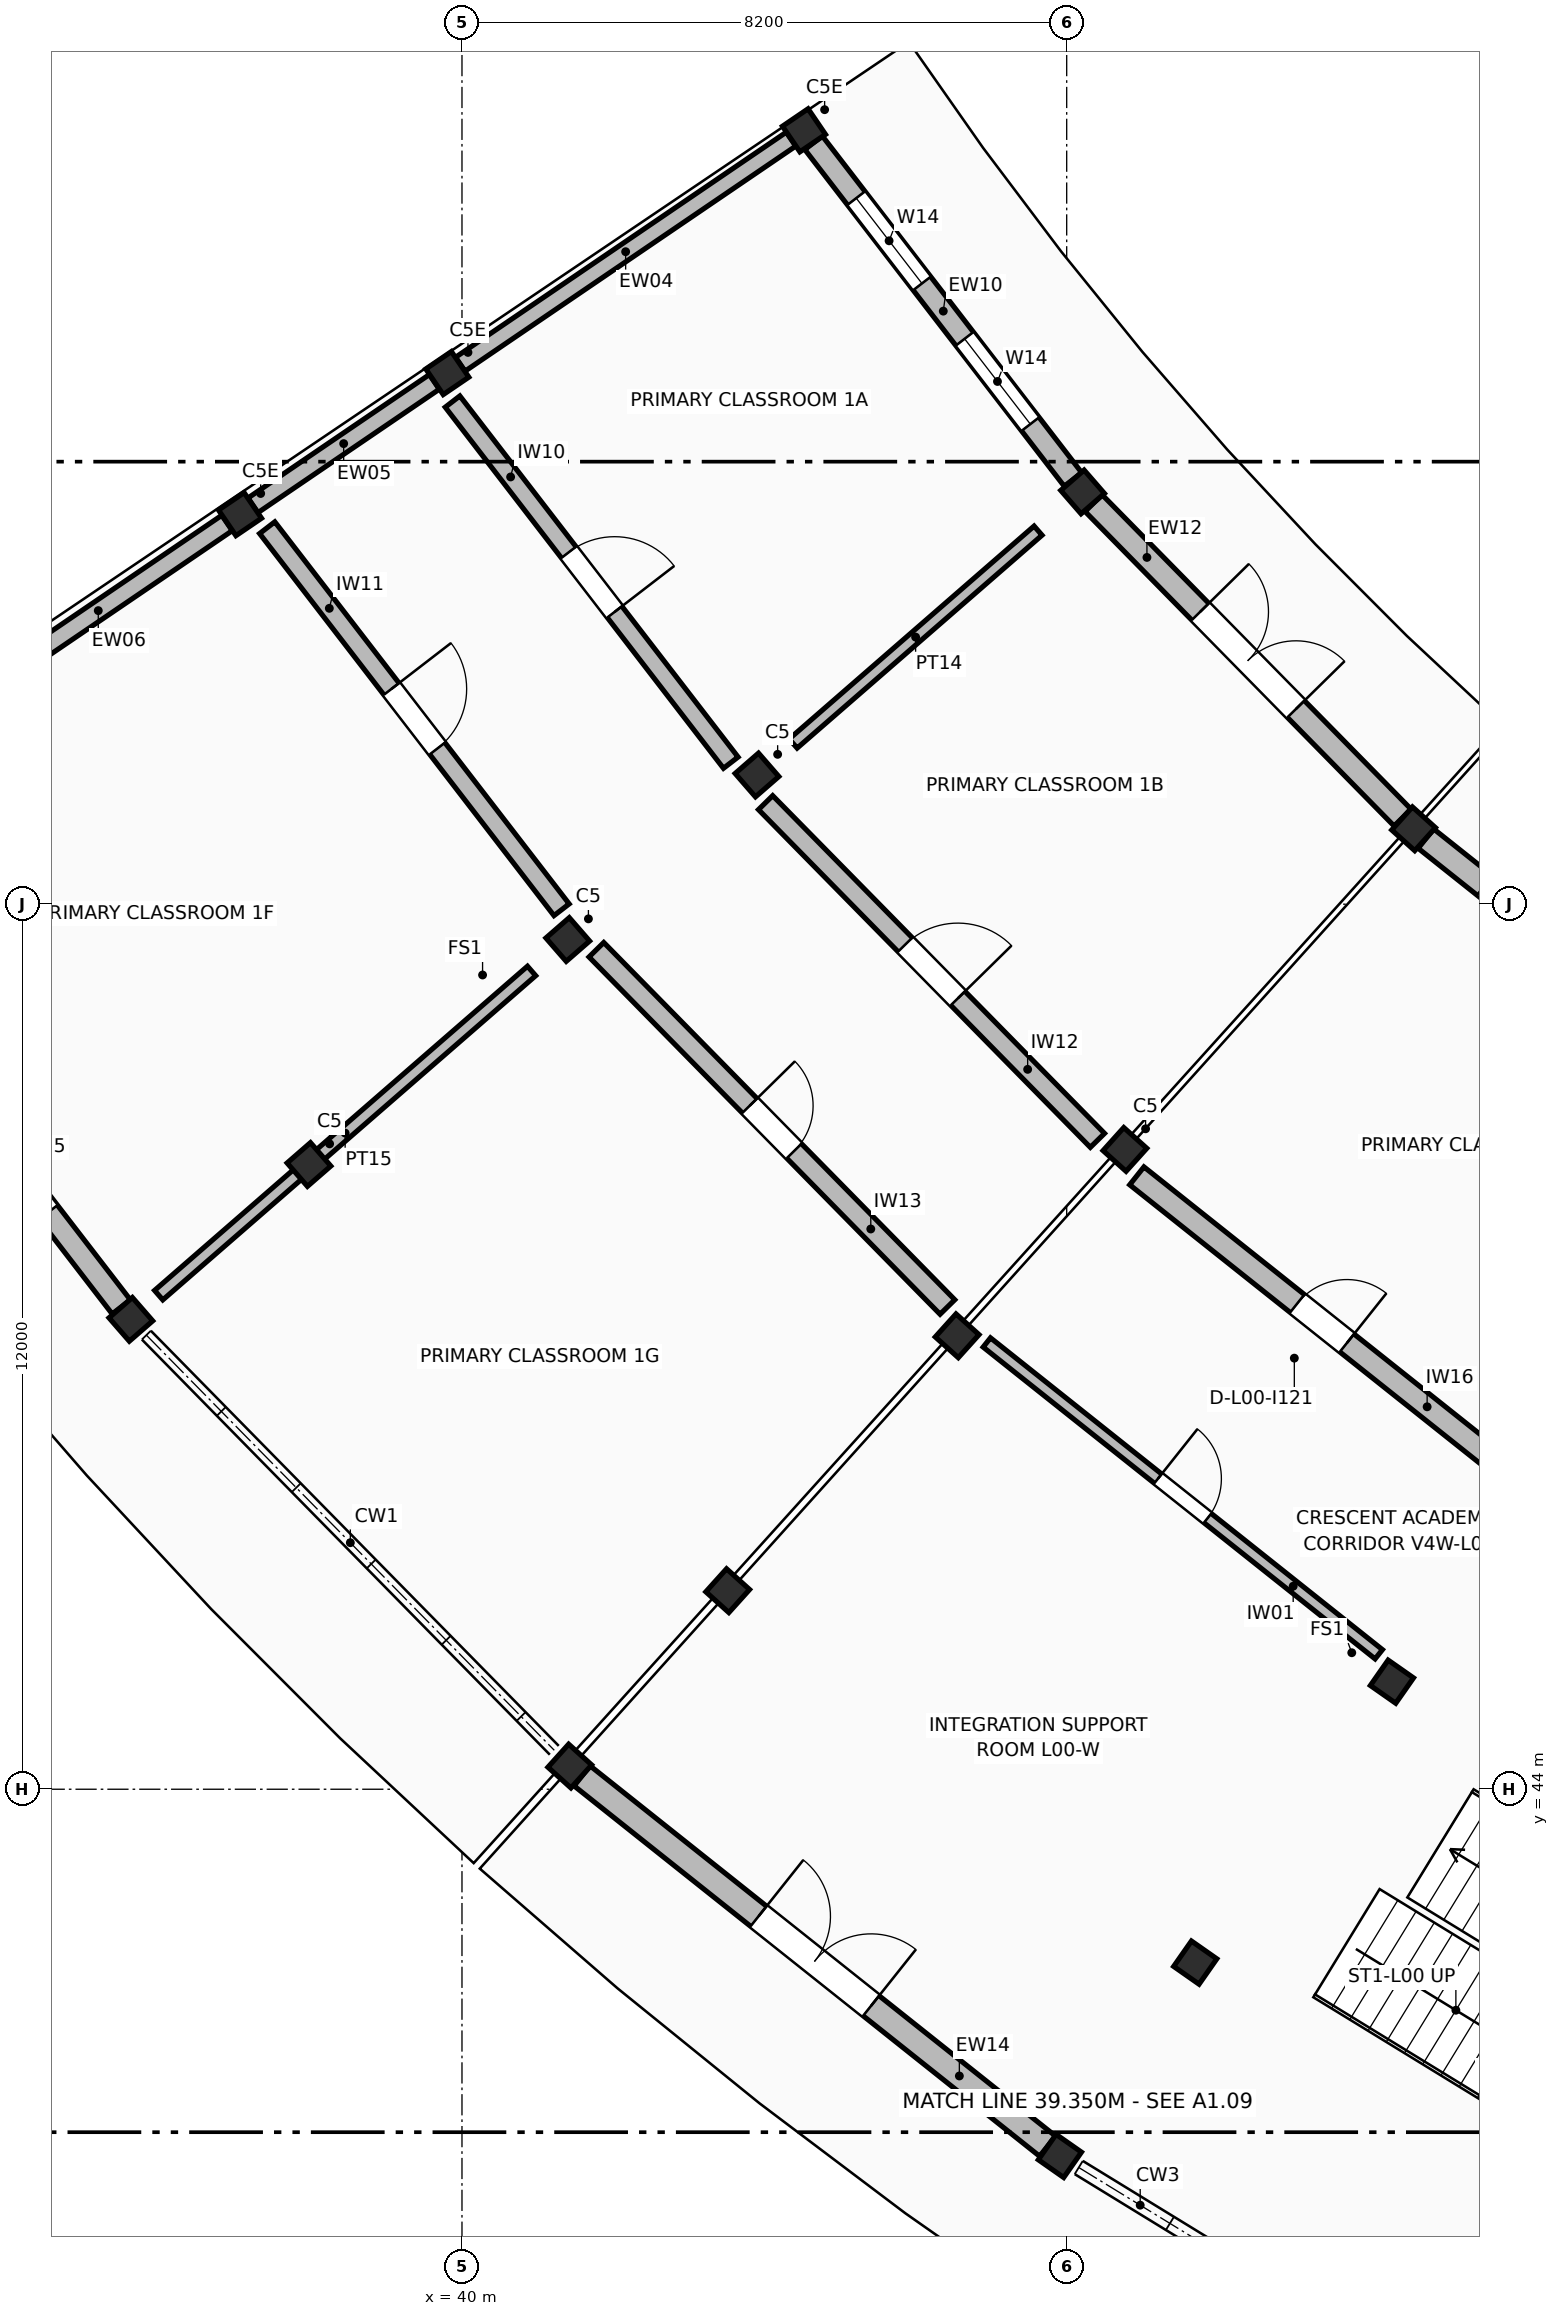
"""IFC4 building model, lengths in metres.
Left out: names, types, materials, properties, quantities, classifications, styles, units other than length and angle.
Written with IfcOpenShell. Run it as: python <this file> out.ifc"""

import sys

from ifc_helpers import new_model, si_unit, direction, frame, frame_2d, origin, origin_2d, place, context, subcontext, project, spatial, rectangle, extrude, element, fill, save


model = new_model("IFC4")
c1 = context("Model", 3, precision=1e-05, world=origin(), true_north=direction((0.0, 1.0)))
c2 = subcontext(c1, "Body", "Model", "MODEL_VIEW")
j1 = project(units=[si_unit("LENGTHUNIT", "METRE"), si_unit("PLANEANGLEUNIT", "RADIAN")], contexts=[c1])
p1 = place(None, origin())
s1 = spatial("IfcSite", under=j1, at=p1, CompositionType="ELEMENT")
p2 = place(p1, origin())
s2 = spatial("IfcBuilding", under=s1, at=p2, CompositionType="ELEMENT")
p3 = place(p2, origin())
s3 = spatial("IfcBuildingStorey", under=s2, at=p3, CompositionType="ELEMENT", Elevation=0.0)
for number, where, z_axis, x_axis in (
    (1, (44.637, 66.492, 0.0), (0.0, 0.0, 1.0), (-0.827, -0.563, 0.0)),
    (2, (39.801, 63.201, 0.0), (0.0, 0.0, 1.0), (-0.827, -0.563, 0.0)),
    (3, (36.99, 61.288, 0.0), (0.0, 0.0, 1.0), (-0.827, -0.563, 0.0)),
    (4, (48.416, 61.59, 0.0), (0.0, 0.0, 1.0), (-0.755, -0.656, 0.0)),
    (5, (44.0, 57.752, 0.0), (0.0, 0.0, 1.0), (-0.755, -0.656, 0.0)),
    (6, (41.434, 55.521, 0.0), (0.0, 0.0, 1.0), (-0.755, -0.656, 0.0)),
    (7, (37.925, 52.47, 0.0), (0.0, 0.0, 1.0), (-0.755, -0.656, 0.0)),
    (8, (35.51, 50.371, 0.0), (0.0, 0.0, 1.0), (-0.755, -0.656, 0.0)),
    (9, (52.904, 57.022, 0.0), (0.0, 0.0, 1.0), (-0.669, -0.743, 0.0)),
    (10, (48.99, 52.675, 0.0), (0.0, 0.0, 1.0), (-0.669, -0.743, 0.0)),
    (11, (46.715, 50.148, 0.0), (0.0, 0.0, 1.0), (-0.669, -0.743, 0.0)),
    (12, (43.603, 46.692, 0.0), (0.0, 0.0, 1.0), (-0.669, -0.743, 0.0)),
    (13, (41.462, 44.314, 0.0), (0.0, 0.0, 1.0), (-0.669, -0.743, 0.0)),
    (14, (52.61, 45.458, 0.0), (0.0, 0.0, 1.0), (-0.574, -0.819, 0.0)),
    (15, (49.943, 41.649, 0.0), (0.0, 0.0, 1.0), (-0.574, -0.819, 0.0)),
    (16, (48.108, 39.028, 0.0), (0.0, 0.0, 1.0), (-0.574, -0.819, 0.0)),
):
    element("IfcColumn", number, at=place(p3, frame(where, z_axis=z_axis, x_axis=x_axis)), inside=s3, PredefinedType="COLUMN", context=c2, shape_type="SweptSolid", body=[
        extrude(rectangle(XDim=0.42, YDim=0.42, at=origin_2d()), origin(), (0.0, 0.0, 1.0), 4.42),
    ])
p4 = place(p3, frame((44.768, 66.324, 0.0), z_axis=(0.0, 0.0, 1.0), x_axis=(0.610359492997, -0.792124541539, 0.0)))
e17 = element("IfcWall", 17, at=p4, inside=s3, PredefinedType="STANDARD", context=c2, shape_type="SweptSolid", body=[
    extrude(rectangle(XDim=5.763, YDim=0.3, at=frame_2d((2.882, 0.0))), origin(), (0.0, 0.0, 1.0), 3.4),
])
p5 = place(p4, frame((0.948, 0.0, 0.95)))
e18 = element("IfcOpeningElement", 18, at=p5, cuts=e17, PredefinedType="OPENING", context=c2, shape_type="SweptSolid", body=[
    extrude(rectangle(XDim=1.46, YDim=1.3, at=frame_2d((0.73, 0.65))), frame((0.0, 0.16, 0.0), z_axis=(0.0, -1.0, 0.0), x_axis=(1.0, 0.0, 0.0)), (0.0, 0.0, 1.0), 0.32),
])
p6 = place(p4, frame((3.356, 0.0, 0.95)))
e19 = element("IfcOpeningElement", 19, at=p6, cuts=e17, PredefinedType="OPENING", context=c2, shape_type="SweptSolid", body=[
    extrude(rectangle(XDim=1.46, YDim=1.3, at=frame_2d((0.73, 0.65))), frame((0.0, 0.16, 0.0), z_axis=(0.0, -1.0, 0.0), x_axis=(1.0, 0.0, 0.0)), (0.0, 0.0, 1.0), 0.32),
])
p7 = place(p3, frame((30.63, 56.703, 0.0), z_axis=(0.0, 0.0, 1.0), x_axis=(0.610380744175, -0.792108166313, 0.0)))
e20 = element("IfcWall", 20, at=p7, inside=s3, PredefinedType="STANDARD", context=c2, shape_type="SweptSolid", body=[
    extrude(rectangle(XDim=7.781, YDim=0.312, at=frame_2d((3.891, 0.0))), origin(), (0.0, 0.0, 1.0), 3.4),
])
p8 = place(p7, frame((1.62, 0.0, 0.95)))
e21 = element("IfcOpeningElement", 21, at=p8, cuts=e20, PredefinedType="OPENING", context=c2, shape_type="SweptSolid", body=[
    extrude(rectangle(XDim=1.46, YDim=1.45, at=frame_2d((0.73, 0.725))), frame((0.0, 0.166, 0.0), z_axis=(0.0, -1.0, 0.0), x_axis=(1.0, 0.0, 0.0)), (0.0, 0.0, 1.0), 0.332),
])
p9 = place(p7, frame((4.701, 0.0, 0.95)))
e22 = element("IfcOpeningElement", 22, at=p9, cuts=e20, PredefinedType="OPENING", context=c2, shape_type="SweptSolid", body=[
    extrude(rectangle(XDim=1.46, YDim=1.45, at=frame_2d((0.73, 0.725))), frame((0.0, 0.166, 0.0), z_axis=(0.0, -1.0, 0.0), x_axis=(1.0, 0.0, 0.0)), (0.0, 0.0, 1.0), 0.332),
])
p10 = place(p3, frame((48.565, 61.438, 0.0), z_axis=(0.0, 0.0, 1.0), x_axis=(0.700933675957, -0.713226459064, 0.0)))
e23 = element("IfcWall", 23, at=p10, inside=s3, PredefinedType="STANDARD", context=c2, shape_type="SweptSolid", body=[
    extrude(rectangle(XDim=5.978, YDim=0.324, at=frame_2d((2.989, 0.0))), origin(), (0.0, 0.0, 1.0), 3.4),
])
p11 = place(p10, frame((2.064, 0.0, 0.0)))
e24 = element("IfcOpeningElement", 24, at=p11, cuts=e23, PredefinedType="OPENING", context=c2, shape_type="SweptSolid", body=[
    extrude(rectangle(XDim=1.85, YDim=2.28, at=frame_2d((0.925, 1.14))), frame((0.0, 0.172, 0.0), z_axis=(0.0, -1.0, 0.0), x_axis=(1.0, 0.0, 0.0)), (0.0, 0.0, 1.0), 0.344),
])
p12 = place(p3, frame((53.071, 56.889, 0.0), z_axis=(0.0, 0.0, 1.0), x_axis=(0.782606932648, -0.62251617567, 0.0)))
e25 = element("IfcWall", 25, at=p12, inside=s3, PredefinedType="STANDARD", context=c2, shape_type="SweptSolid", body=[
    extrude(rectangle(XDim=5.978, YDim=0.336, at=frame_2d((2.989, 0.0))), origin(), (0.0, 0.0, 1.0), 3.4),
])
p13 = place(p12, frame((1.019, 0.0, 0.95)))
e26 = element("IfcOpeningElement", 26, at=p13, cuts=e25, PredefinedType="OPENING", context=c2, shape_type="SweptSolid", body=[
    extrude(rectangle(XDim=1.46, YDim=1.6, at=frame_2d((0.73, 0.8))), frame((0.0, 0.178, 0.0), z_axis=(0.0, -1.0, 0.0), x_axis=(1.0, 0.0, 0.0)), (0.0, 0.0, 1.0), 0.356),
])
p14 = place(p12, frame((3.499, 0.0, 0.95)))
e27 = element("IfcOpeningElement", 27, at=p14, cuts=e25, PredefinedType="OPENING", context=c2, shape_type="SweptSolid", body=[
    extrude(rectangle(XDim=1.46, YDim=1.6, at=frame_2d((0.73, 0.8))), frame((0.0, 0.178, 0.0), z_axis=(0.0, -1.0, 0.0), x_axis=(1.0, 0.0, 0.0)), (0.0, 0.0, 1.0), 0.356),
])
p15 = place(p3, frame((41.629, 44.182, 0.0), z_axis=(0.0, 0.0, 1.0), x_axis=(0.782619821953, -0.622499971314, 0.0)))
e28 = element("IfcWall", 28, at=p15, inside=s3, PredefinedType="STANDARD", context=c2, shape_type="SweptSolid", body=[
    extrude(rectangle(XDim=8.066, YDim=0.348, at=frame_2d((4.033, 0.0))), origin(), (0.0, 0.0, 1.0), 3.4),
])
p16 = place(p15, frame((3.058, 0.0, 0.0)))
e29 = element("IfcOpeningElement", 29, at=p16, cuts=e28, PredefinedType="OPENING", context=c2, shape_type="SweptSolid", body=[
    extrude(rectangle(XDim=1.95, YDim=2.28, at=frame_2d((0.975, 1.14))), frame((0.0, 0.184, 0.0), z_axis=(0.0, -1.0, 0.0), x_axis=(1.0, 0.0, 0.0)), (0.0, 0.0, 1.0), 0.368),
])
p17 = place(p3, frame((44.461, 66.373, 0.0), z_axis=(0.0, 0.0, 1.0), x_axis=(-0.826728872558, -0.562600543262, 0.0)))
e30 = element("IfcWall", 30, at=p17, inside=s3, PredefinedType="STANDARD", context=c2, shape_type="SweptSolid", body=[
    extrude(rectangle(XDim=5.424, YDim=0.228, at=frame_2d((2.712, 0.0))), origin(), (0.0, 0.0, 1.0), 3.4),
])
p18 = place(p3, frame((39.625, 63.081, 0.0), z_axis=(0.0, 0.0, 1.0), x_axis=(-0.826746288828, -0.562574949592, 0.0)))
e31 = element("IfcWall", 31, at=p18, inside=s3, PredefinedType="STANDARD", context=c2, shape_type="SweptSolid", body=[
    extrude(rectangle(XDim=2.974, YDim=0.24, at=frame_2d((1.487, 0.0))), origin(), (0.0, 0.0, 1.0), 3.4),
])
p19 = place(p3, frame((36.814, 61.169, 0.0), z_axis=(0.0, 0.0, 1.0), x_axis=(-0.826730801619, -0.56259770854, 0.0)))
e32 = element("IfcWall", 32, at=p19, inside=s3, PredefinedType="STANDARD", context=c2, shape_type="SweptSolid", body=[
    extrude(rectangle(XDim=4.224, YDim=0.252, at=frame_2d((2.112, 0.0))), origin(), (0.0, 0.0, 1.0), 3.4),
])
p20 = place(p3, frame((39.872, 62.815, 0.0), z_axis=(0.0, 0.0, 1.0), x_axis=(0.610376740954, -0.79211125109, 0.0)))
e33 = element("IfcWall", 33, at=p20, inside=s3, PredefinedType="STANDARD", context=c2, shape_type="SweptSolid", body=[
    extrude(rectangle(XDim=6.181, YDim=0.25, at=frame_2d((3.09, 0.0))), origin(), (0.0, 0.0, 1.0), 3.38),
])
p21 = place(p20, frame((2.581, 0.0, 0.0)))
e34 = element("IfcOpeningElement", 34, at=p21, cuts=e33, PredefinedType="OPENING", context=c2, shape_type="SweptSolid", body=[
    extrude(rectangle(XDim=1.02, YDim=2.12, at=frame_2d((0.51, 1.06))), frame((0.0, 0.135, 0.0), z_axis=(0.0, -1.0, 0.0), x_axis=(1.0, 0.0, 0.0)), (0.0, 0.0, 1.0), 0.27),
])
p22 = place(p3, frame((37.359, 61.104, 0.0), z_axis=(0.0, 0.0, 1.0), x_axis=(0.610378079511, -0.792110219637, 0.0)))
e35 = element("IfcWall", 35, at=p22, inside=s3, PredefinedType="STANDARD", context=c2, shape_type="SweptSolid", body=[
    extrude(rectangle(XDim=6.54, YDim=0.26, at=frame_2d((3.27, 0.0))), origin(), (0.0, 0.0, 1.0), 3.38),
])
p23 = place(p22, frame((2.76, 0.0, 0.0)))
e36 = element("IfcOpeningElement", 36, at=p23, cuts=e35, PredefinedType="OPENING", context=c2, shape_type="SweptSolid", body=[
    extrude(rectangle(XDim=1.02, YDim=2.18, at=frame_2d((0.51, 1.09))), frame((0.0, 0.14, 0.0), z_axis=(0.0, -1.0, 0.0), x_axis=(1.0, 0.0, 0.0)), (0.0, 0.0, 1.0), 0.28),
])
p24 = place(p3, frame((44.117, 57.377, 0.0), z_axis=(0.0, 0.0, 1.0), x_axis=(0.700900509406, -0.713259052459, 0.0)))
e37 = element("IfcWall", 37, at=p24, inside=s3, PredefinedType="STANDARD", context=c2, shape_type="SweptSolid", body=[
    extrude(rectangle(XDim=6.42, YDim=0.27, at=frame_2d((3.21, 0.0))), origin(), (0.0, 0.0, 1.0), 3.38),
])
p25 = place(p24, frame((2.7, 0.0, 0.0)))
e38 = element("IfcOpeningElement", 38, at=p25, cuts=e37, PredefinedType="OPENING", context=c2, shape_type="SweptSolid", body=[
    extrude(rectangle(XDim=1.02, YDim=2.24, at=frame_2d((0.51, 1.12))), frame((0.0, 0.145, 0.0), z_axis=(0.0, -1.0, 0.0), x_axis=(1.0, 0.0, 0.0)), (0.0, 0.0, 1.0), 0.29),
])
p26 = place(p3, frame((41.823, 55.383, 0.0), z_axis=(0.0, 0.0, 1.0), x_axis=(0.700914816473, -0.713244993006, 0.0)))
e39 = element("IfcWall", 39, at=p26, inside=s3, PredefinedType="STANDARD", context=c2, shape_type="SweptSolid", body=[
    extrude(rectangle(XDim=6.792, YDim=0.28, at=frame_2d((3.396, 0.0))), origin(), (0.0, 0.0, 1.0), 3.38),
])
p27 = place(p26, frame((2.966, 0.0, 0.0)))
e40 = element("IfcOpeningElement", 40, at=p27, cuts=e39, PredefinedType="OPENING", context=c2, shape_type="SweptSolid", body=[
    extrude(rectangle(XDim=0.86, YDim=2.06, at=frame_2d((0.43, 1.03))), frame((0.0, 0.15, 0.0), z_axis=(0.0, -1.0, 0.0), x_axis=(1.0, 0.0, 0.0)), (0.0, 0.0, 1.0), 0.3),
])
p28 = place(p3, frame((47.812, 61.065, 0.0), z_axis=(0.0, 0.0, 1.0), x_axis=(-0.75471062989, -0.656057821484, 0.0)))
e41 = element("IfcWall", 41, at=p28, inside=s3, PredefinedType="PARTITIONING", context=c2, shape_type="SweptSolid", body=[
    extrude(rectangle(XDim=4.4, YDim=0.164, at=frame_2d((2.2, 0.0))), origin(), (0.0, 0.0, 1.0), 3.38),
])
p29 = place(p3, frame((40.944, 55.095, 0.0), z_axis=(0.0, 0.0, 1.0), x_axis=(-0.754721612631, -0.656045187032, 0.0)))
e42 = element("IfcWall", 42, at=p29, inside=s3, PredefinedType="PARTITIONING", context=c2, shape_type="SweptSolid", body=[
    extrude(rectangle(XDim=6.7, YDim=0.17, at=frame_2d((3.35, 0.0))), origin(), (0.0, 0.0, 1.0), 3.38),
])
p30 = place(p3, frame((49.151, 52.317, 0.0), z_axis=(0.0, 0.0, 1.0), x_axis=(0.782605685559, -0.622517743467, 0.0)))
e43 = element("IfcWall", 43, at=p30, inside=s3, PredefinedType="STANDARD", context=c2, shape_type="SweptSolid", body=[
    extrude(rectangle(XDim=6.42, YDim=0.31, at=frame_2d((3.21, 0.0))), origin(), (0.0, 0.0, 1.0), 3.38),
])
p31 = place(p30, frame((2.78, 0.0, 0.0)))
e44 = element("IfcOpeningElement", 44, at=p31, cuts=e43, PredefinedType="OPENING", context=c2, shape_type="SweptSolid", body=[
    extrude(rectangle(XDim=0.86, YDim=2.12, at=frame_2d((0.43, 1.06))), frame((0.0, 0.165, 0.0), z_axis=(0.0, -1.0, 0.0), x_axis=(1.0, 0.0, 0.0)), (0.0, 0.0, 1.0), 0.33),
])
p32 = place(p3, frame((47.117, 50.058, 0.0), z_axis=(0.0, 0.0, 1.0), x_axis=(0.782615780998, -0.622505051653, 0.0)))
e45 = element("IfcWall", 45, at=p32, inside=s3, PredefinedType="STANDARD", context=c2, shape_type="SweptSolid", body=[
    extrude(rectangle(XDim=6.792, YDim=0.16, at=frame_2d((3.396, 0.0))), origin(), (0.0, 0.0, 1.0), 3.38),
])
p33 = place(p32, frame((2.966, 0.0, 0.0)))
e46 = element("IfcOpeningElement", 46, at=p33, cuts=e45, PredefinedType="OPENING", context=c2, shape_type="SweptSolid", body=[
    extrude(rectangle(XDim=0.86, YDim=2.18, at=frame_2d((0.43, 1.09))), frame((0.0, 0.09, 0.0), z_axis=(0.0, -1.0, 0.0), x_axis=(1.0, 0.0, 0.0)), (0.0, 0.0, 1.0), 0.18),
])
p34 = place(p5, origin())
e47 = element("IfcWindow", 47, at=p34, inside=s3, PartitioningType="SINGLE_PANEL", PredefinedType="WINDOW", context=c2, shape_type="SweptSolid", body=[
    extrude(rectangle(XDim=1.46, YDim=1.3, at=frame_2d((0.73, 0.65))), frame((0.0, 0.03, 0.0), z_axis=(0.0, -1.0, 0.0), x_axis=(1.0, 0.0, 0.0)), (0.0, 0.0, 1.0), 0.06),
])
fill(e18, e47)
p35 = place(p6, origin())
e48 = element("IfcWindow", 48, at=p35, inside=s3, PartitioningType="SINGLE_PANEL", PredefinedType="WINDOW", context=c2, shape_type="SweptSolid", body=[
    extrude(rectangle(XDim=1.46, YDim=1.3, at=frame_2d((0.73, 0.65))), frame((0.0, 0.03, 0.0), z_axis=(0.0, -1.0, 0.0), x_axis=(1.0, 0.0, 0.0)), (0.0, 0.0, 1.0), 0.06),
])
fill(e19, e48)
p36 = place(p11, origin())
e49 = element("IfcDoor", 49, at=p36, inside=s3, OperationType="DOUBLE_DOOR_SINGLE_SWING", PredefinedType="DOOR", context=c2, shape_type="SweptSolid", body=[
    extrude(rectangle(XDim=1.85, YDim=2.28, at=frame_2d((0.925, 1.14))), frame((0.0, 0.025, 0.0), z_axis=(0.0, -1.0, 0.0), x_axis=(1.0, 0.0, 0.0)), (0.0, 0.0, 1.0), 0.05),
])
fill(e24, e49)
p37 = place(p16, frame((1.95, 0.0, 0.0), z_axis=(0.0, 0.0, 1.0), x_axis=(-1.0, 0.0, 0.0)))
e50 = element("IfcDoor", 50, at=p37, inside=s3, OperationType="DOUBLE_DOOR_SINGLE_SWING", PredefinedType="DOOR", context=c2, shape_type="SweptSolid", body=[
    extrude(rectangle(XDim=1.95, YDim=2.28, at=frame_2d((0.975, 1.14))), frame((0.0, 0.025, 0.0), z_axis=(0.0, -1.0, 0.0), x_axis=(1.0, 0.0, 0.0)), (0.0, 0.0, 1.0), 0.05),
])
fill(e29, e50)
p38 = place(p21, frame((1.02, 0.0, 0.0), z_axis=(0.0, 0.0, 1.0), x_axis=(-1.0, 0.0, 0.0)))
e51 = element("IfcDoor", 51, at=p38, inside=s3, OperationType="SINGLE_SWING_RIGHT", PredefinedType="DOOR", context=c2, shape_type="SweptSolid", body=[
    extrude(rectangle(XDim=1.02, YDim=2.12, at=frame_2d((0.51, 1.06))), frame((0.0, 0.025, 0.0), z_axis=(0.0, -1.0, 0.0), x_axis=(1.0, 0.0, 0.0)), (0.0, 0.0, 1.0), 0.05),
])
fill(e34, e51)
p39 = place(p23, origin())
e52 = element("IfcDoor", 52, at=p39, inside=s3, OperationType="SINGLE_SWING_LEFT", PredefinedType="DOOR", context=c2, shape_type="SweptSolid", body=[
    extrude(rectangle(XDim=1.02, YDim=2.18, at=frame_2d((0.51, 1.09))), frame((0.0, 0.025, 0.0), z_axis=(0.0, -1.0, 0.0), x_axis=(1.0, 0.0, 0.0)), (0.0, 0.0, 1.0), 0.05),
])
fill(e36, e52)
p40 = place(p25, frame((1.02, 0.0, 0.0), z_axis=(0.0, 0.0, 1.0), x_axis=(-1.0, 0.0, 0.0)))
e53 = element("IfcDoor", 53, at=p40, inside=s3, OperationType="SINGLE_SWING_RIGHT", PredefinedType="DOOR", context=c2, shape_type="SweptSolid", body=[
    extrude(rectangle(XDim=1.02, YDim=2.24, at=frame_2d((0.51, 1.12))), frame((0.0, 0.025, 0.0), z_axis=(0.0, -1.0, 0.0), x_axis=(1.0, 0.0, 0.0)), (0.0, 0.0, 1.0), 0.05),
])
fill(e38, e53)
p41 = place(p27, origin())
e54 = element("IfcDoor", 54, at=p41, inside=s3, OperationType="SINGLE_SWING_LEFT", PredefinedType="DOOR", context=c2, shape_type="SweptSolid", body=[
    extrude(rectangle(XDim=0.86, YDim=2.06, at=frame_2d((0.43, 1.03))), frame((0.0, 0.025, 0.0), z_axis=(0.0, -1.0, 0.0), x_axis=(1.0, 0.0, 0.0)), (0.0, 0.0, 1.0), 0.05),
])
fill(e40, e54)
p42 = place(p31, frame((0.86, 0.0, 0.0), z_axis=(0.0, 0.0, 1.0), x_axis=(-1.0, 0.0, 0.0)))
e55 = element("IfcDoor", 55, at=p42, inside=s3, OperationType="SINGLE_SWING_RIGHT", PredefinedType="DOOR", context=c2, shape_type="SweptSolid", body=[
    extrude(rectangle(XDim=0.86, YDim=2.12, at=frame_2d((0.43, 1.06))), frame((0.0, 0.025, 0.0), z_axis=(0.0, -1.0, 0.0), x_axis=(1.0, 0.0, 0.0)), (0.0, 0.0, 1.0), 0.05),
])
fill(e44, e55)
p43 = place(p33, origin())
e56 = element("IfcDoor", 56, at=p43, inside=s3, OperationType="SINGLE_SWING_LEFT", PredefinedType="DOOR", context=c2, shape_type="SweptSolid", body=[
    extrude(rectangle(XDim=0.86, YDim=2.18, at=frame_2d((0.43, 1.09))), frame((0.0, 0.025, 0.0), z_axis=(0.0, -1.0, 0.0), x_axis=(1.0, 0.0, 0.0)), (0.0, 0.0, 1.0), 0.05),
])
fill(e46, e56)
save(model, sys.argv[1])
